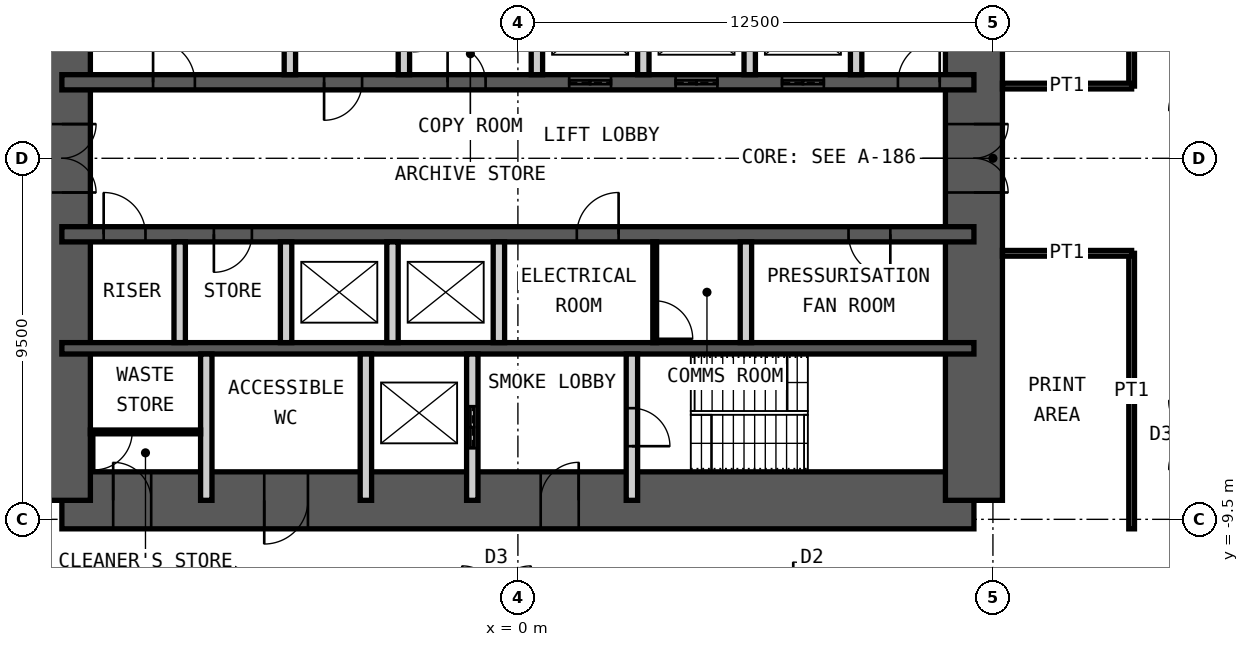
"""IFC4 building model, lengths in metres.
Left out: names, types, materials, properties, quantities, classifications, styles, units other than length and angle.
Written with IfcOpenShell. Run it as: python <this file> out.ifc"""

import sys

from ifc_helpers import new_model, si_unit, direction, frame, frame_2d, origin, place, context, subcontext, project, spatial, rectangle, extrude, element, fill, save


model = new_model("IFC4")
c1 = context("Model", 3, precision=1e-05, world=origin(), true_north=direction((0.0, 1.0)))
c2 = subcontext(c1, "Body", "Model", "MODEL_VIEW")
j1 = project(units=[si_unit("LENGTHUNIT", "METRE"), si_unit("PLANEANGLEUNIT", "RADIAN")], contexts=[c1])
p1 = place(None, origin())
s1 = spatial("IfcSite", under=j1, at=p1, CompositionType="ELEMENT")
p2 = place(p1, origin())
s2 = spatial("IfcBuilding", under=s1, at=p2, CompositionType="ELEMENT")
p3 = place(p2, frame((0.0, 0.0, 157.6)))
s3 = spatial("IfcBuildingStorey", under=s2, at=p3, CompositionType="ELEMENT", Elevation=157.6)
p4 = place(p3, frame((-12.0, -9.0, 0.0), z_axis=(0.0, 0.0, 1.0), x_axis=(1.0, 0.0, 0.0)))
e1 = element("IfcWall", 1, at=p4, inside=s3, PredefinedType="SHEAR", context=c2, shape_type="SweptSolid", body=[
    extrude(rectangle(XDim=24.0, YDim=1.5, at=frame_2d((12.0, 0.0))), origin(), (0.0, 0.0, 1.0), 4.2),
])
p5 = place(p4, frame((1.35, 0.0, 0.0)))
e2 = element("IfcOpeningElement", 2, at=p5, cuts=e1, PredefinedType="OPENING", context=c2, shape_type="SweptSolid", body=[
    extrude(rectangle(XDim=1.0, YDim=2.1, at=frame_2d((0.5, 1.05))), frame((0.0, 0.76, 0.0), z_axis=(0.0, -1.0, 0.0), x_axis=(1.0, 0.0, 0.0)), (0.0, 0.0, 1.0), 1.52),
])
p6 = place(p4, frame((5.325, 0.0, 0.0)))
e3 = element("IfcOpeningElement", 3, at=p6, cuts=e1, PredefinedType="OPENING", context=c2, shape_type="SweptSolid", body=[
    extrude(rectangle(XDim=1.15, YDim=2.1, at=frame_2d((0.575, 1.05))), frame((0.0, 0.76, 0.0), z_axis=(0.0, -1.0, 0.0), x_axis=(1.0, 0.0, 0.0)), (0.0, 0.0, 1.0), 1.52),
])
p7 = place(p4, frame((12.6, 0.0, 0.0)))
e4 = element("IfcOpeningElement", 4, at=p7, cuts=e1, PredefinedType="OPENING", context=c2, shape_type="SweptSolid", body=[
    extrude(rectangle(XDim=1.0, YDim=2.1, at=frame_2d((0.5, 1.05))), frame((0.0, 0.76, 0.0), z_axis=(0.0, -1.0, 0.0), x_axis=(1.0, 0.0, 0.0)), (0.0, 0.0, 1.0), 1.52),
])
p8 = place(p3, frame((12.0, -9.0, 0.0), z_axis=(0.0, 0.0, 1.0), x_axis=(0.0, 1.0, 0.0)))
e5 = element("IfcWall", 5, at=p8, inside=s3, PredefinedType="SHEAR", context=c2, shape_type="SweptSolid", body=[
    extrude(rectangle(XDim=18.0, YDim=1.5, at=frame_2d((9.0, 0.0))), origin(), (0.0, 0.0, 1.0), 4.2),
])
p9 = place(p8, frame((8.1, 0.0, 0.0)))
e6 = element("IfcOpeningElement", 6, at=p9, cuts=e5, PredefinedType="OPENING", context=c2, shape_type="SweptSolid", body=[
    extrude(rectangle(XDim=1.8, YDim=2.1, at=frame_2d((0.9, 1.05))), frame((0.0, 0.76, 0.0), z_axis=(0.0, -1.0, 0.0), x_axis=(1.0, 0.0, 0.0)), (0.0, 0.0, 1.0), 1.52),
])
p10 = place(p3, frame((-12.0, -9.0, 0.0), z_axis=(0.0, 0.0, 1.0), x_axis=(0.0, 1.0, 0.0)))
e7 = element("IfcWall", 7, at=p10, inside=s3, PredefinedType="SHEAR", context=c2, shape_type="SweptSolid", body=[
    extrude(rectangle(XDim=18.0, YDim=1.5, at=frame_2d((9.0, 0.0))), origin(), (0.0, 0.0, 1.0), 4.2),
])
p11 = place(p10, frame((8.1, 0.0, 0.0)))
e8 = element("IfcOpeningElement", 8, at=p11, cuts=e7, PredefinedType="OPENING", context=c2, shape_type="SweptSolid", body=[
    extrude(rectangle(XDim=1.8, YDim=2.1, at=frame_2d((0.9, 1.05))), frame((0.0, 0.76, 0.0), z_axis=(0.0, -1.0, 0.0), x_axis=(1.0, 0.0, 0.0)), (0.0, 0.0, 1.0), 1.52),
])
p12 = place(p3, frame((-12.0, 2.0, 0.0), z_axis=(0.0, 0.0, 1.0), x_axis=(1.0, 0.0, 0.0)))
e9 = element("IfcWall", 9, at=p12, inside=s3, PredefinedType="SHEAR", context=c2, shape_type="SweptSolid", body=[
    extrude(rectangle(XDim=24.0, YDim=0.4, at=frame_2d((12.0, 0.0))), origin(), (0.0, 0.0, 1.0), 4.2),
])
p13 = place(p12, frame((2.4, 0.0, 0.0)))
e10 = element("IfcOpeningElement", 10, at=p13, cuts=e9, PredefinedType="OPENING", context=c2, shape_type="SweptSolid", body=[
    extrude(rectangle(XDim=1.1, YDim=2.1, at=frame_2d((0.55, 1.05))), frame((0.0, 0.21, 0.0), z_axis=(0.0, -1.0, 0.0), x_axis=(1.0, 0.0, 0.0)), (0.0, 0.0, 1.0), 0.42),
])
p14 = place(p12, frame((22.0, 0.0, 0.0)))
e11 = element("IfcOpeningElement", 11, at=p14, cuts=e9, PredefinedType="OPENING", context=c2, shape_type="SweptSolid", body=[
    extrude(rectangle(XDim=1.1, YDim=2.1, at=frame_2d((0.55, 1.05))), frame((0.0, 0.21, 0.0), z_axis=(0.0, -1.0, 0.0), x_axis=(1.0, 0.0, 0.0)), (0.0, 0.0, 1.0), 0.42),
])
p15 = place(p12, frame((10.15, 0.0, 0.0)))
e12 = element("IfcOpeningElement", 12, at=p15, cuts=e9, PredefinedType="OPENING", context=c2, shape_type="SweptSolid", body=[
    extrude(rectangle(XDim=1.0, YDim=2.1, at=frame_2d((0.5, 1.05))), frame((0.0, 0.21, 0.0), z_axis=(0.0, -1.0, 0.0), x_axis=(1.0, 0.0, 0.0)), (0.0, 0.0, 1.0), 0.42),
])
p16 = place(p12, frame((6.9, 0.0, 0.0)))
e13 = element("IfcOpeningElement", 13, at=p16, cuts=e9, PredefinedType="OPENING", context=c2, shape_type="SweptSolid", body=[
    extrude(rectangle(XDim=1.0, YDim=2.1, at=frame_2d((0.5, 1.05))), frame((0.0, 0.21, 0.0), z_axis=(0.0, -1.0, 0.0), x_axis=(1.0, 0.0, 0.0)), (0.0, 0.0, 1.0), 0.42),
])
p17 = place(p12, frame((13.35, 0.0, 0.0)))
e14 = element("IfcOpeningElement", 14, at=p17, cuts=e9, PredefinedType="OPENING", context=c2, shape_type="SweptSolid", body=[
    extrude(rectangle(XDim=1.1, YDim=2.4, at=frame_2d((0.55, 1.2))), frame((0.0, 0.21, 0.0), z_axis=(0.0, -1.0, 0.0), x_axis=(1.0, 0.0, 0.0)), (0.0, 0.0, 1.0), 0.42),
])
p18 = place(p12, frame((16.15, 0.0, 0.0)))
e15 = element("IfcOpeningElement", 15, at=p18, cuts=e9, PredefinedType="OPENING", context=c2, shape_type="SweptSolid", body=[
    extrude(rectangle(XDim=1.1, YDim=2.4, at=frame_2d((0.55, 1.2))), frame((0.0, 0.21, 0.0), z_axis=(0.0, -1.0, 0.0), x_axis=(1.0, 0.0, 0.0)), (0.0, 0.0, 1.0), 0.42),
])
p19 = place(p12, frame((18.95, 0.0, 0.0)))
e16 = element("IfcOpeningElement", 16, at=p19, cuts=e9, PredefinedType="OPENING", context=c2, shape_type="SweptSolid", body=[
    extrude(rectangle(XDim=1.1, YDim=2.4, at=frame_2d((0.55, 1.2))), frame((0.0, 0.21, 0.0), z_axis=(0.0, -1.0, 0.0), x_axis=(1.0, 0.0, 0.0)), (0.0, 0.0, 1.0), 0.42),
])
p20 = place(p3, frame((-12.0, -2.0, 0.0), z_axis=(0.0, 0.0, 1.0), x_axis=(1.0, 0.0, 0.0)))
e17 = element("IfcWall", 17, at=p20, inside=s3, PredefinedType="SHEAR", context=c2, shape_type="SweptSolid", body=[
    extrude(rectangle(XDim=24.0, YDim=0.4, at=frame_2d((12.0, 0.0))), origin(), (0.0, 0.0, 1.0), 4.2),
])
p21 = place(p20, frame((1.1, 0.0, 0.0)))
e18 = element("IfcOpeningElement", 18, at=p21, cuts=e17, PredefinedType="OPENING", context=c2, shape_type="SweptSolid", body=[
    extrude(rectangle(XDim=1.1, YDim=2.1, at=frame_2d((0.55, 1.05))), frame((0.0, 0.21, 0.0), z_axis=(0.0, -1.0, 0.0), x_axis=(1.0, 0.0, 0.0)), (0.0, 0.0, 1.0), 0.42),
])
p22 = place(p20, frame((13.55, 0.0, 0.0)))
e19 = element("IfcOpeningElement", 19, at=p22, cuts=e17, PredefinedType="OPENING", context=c2, shape_type="SweptSolid", body=[
    extrude(rectangle(XDim=1.1, YDim=2.1, at=frame_2d((0.55, 1.05))), frame((0.0, 0.21, 0.0), z_axis=(0.0, -1.0, 0.0), x_axis=(1.0, 0.0, 0.0)), (0.0, 0.0, 1.0), 0.42),
])
p23 = place(p20, frame((20.7, 0.0, 0.0)))
e20 = element("IfcOpeningElement", 20, at=p23, cuts=e17, PredefinedType="OPENING", context=c2, shape_type="SweptSolid", body=[
    extrude(rectangle(XDim=1.1, YDim=2.1, at=frame_2d((0.55, 1.05))), frame((0.0, 0.21, 0.0), z_axis=(0.0, -1.0, 0.0), x_axis=(1.0, 0.0, 0.0)), (0.0, 0.0, 1.0), 0.42),
])
p24 = place(p20, frame((4.0, 0.0, 0.0)))
e21 = element("IfcOpeningElement", 21, at=p24, cuts=e17, PredefinedType="OPENING", context=c2, shape_type="SweptSolid", body=[
    extrude(rectangle(XDim=1.0, YDim=2.1, at=frame_2d((0.5, 1.05))), frame((0.0, 0.21, 0.0), z_axis=(0.0, -1.0, 0.0), x_axis=(1.0, 0.0, 0.0)), (0.0, 0.0, 1.0), 0.42),
])
p25 = place(p3, frame((-12.0, -5.0, 0.0), z_axis=(0.0, 0.0, 1.0), x_axis=(1.0, 0.0, 0.0)))
e22 = element("IfcWall", 22, at=p25, inside=s3, PredefinedType="SHEAR", context=c2, shape_type="SweptSolid", body=[
    extrude(rectangle(XDim=24.0, YDim=0.3, at=frame_2d((12.0, 0.0))), origin(), (0.0, 0.0, 1.0), 4.2),
])
for number, where, z_axis, x_axis in (
    (23, (-6.0, 2.2, 0.0), (0.0, 0.0, 1.0), (0.0, 1.0, 0.0)),
    (24, (-3.0, 2.2, 0.0), (0.0, 0.0, 1.0), (0.0, 1.0, 0.0)),
    (25, (0.5, 2.2, 0.0), (0.0, 0.0, 1.0), (0.0, 1.0, 0.0)),
    (26, (3.3, 2.2, 0.0), (0.0, 0.0, 1.0), (0.0, 1.0, 0.0)),
    (27, (6.1, 2.2, 0.0), (0.0, 0.0, 1.0), (0.0, 1.0, 0.0)),
    (28, (8.9, 2.2, 0.0), (0.0, 0.0, 1.0), (0.0, 1.0, 0.0)),
    (29, (-8.9, -4.85, 0.0), (0.0, 0.0, 1.0), (0.0, 1.0, 0.0)),
    (30, (-6.1, -4.85, 0.0), (0.0, 0.0, 1.0), (0.0, 1.0, 0.0)),
    (31, (-3.3, -4.85, 0.0), (0.0, 0.0, 1.0), (0.0, 1.0, 0.0)),
    (32, (-0.5, -4.85, 0.0), (0.0, 0.0, 1.0), (0.0, 1.0, 0.0)),
    (33, (6.0, -4.85, 0.0), (0.0, 0.0, 1.0), (0.0, 1.0, 0.0)),
):
    element("IfcWall", number, at=place(p3, frame(where, z_axis=z_axis, x_axis=x_axis)), inside=s3, PredefinedType="PARTITIONING", context=c2, shape_type="SweptSolid", body=[
        extrude(rectangle(XDim=2.65, YDim=0.3, at=frame_2d((1.325, 0.0))), origin(), (0.0, 0.0, 1.0), 3.98),
    ])
for number, where, z_axis, x_axis in (
    (34, (-8.2, -9.0, 0.0), (0.0, 0.0, 1.0), (0.0, 1.0, 0.0)),
    (35, (-4.0, -9.0, 0.0), (0.0, 0.0, 1.0), (0.0, 1.0, 0.0)),
):
    element("IfcWall", number, at=place(p3, frame(where, z_axis=z_axis, x_axis=x_axis)), inside=s3, PredefinedType="PARTITIONING", context=c2, shape_type="SweptSolid", body=[
        extrude(rectangle(XDim=3.85, YDim=0.3, at=frame_2d((1.925, 0.0))), origin(), (0.0, 0.0, 1.0), 3.98),
    ])
p26 = place(p3, frame((-1.2, -9.0, 0.0), z_axis=(0.0, 0.0, 1.0), x_axis=(0.0, 1.0, 0.0)))
e36 = element("IfcWall", 36, at=p26, inside=s3, PredefinedType="PARTITIONING", context=c2, shape_type="SweptSolid", body=[
    extrude(rectangle(XDim=3.85, YDim=0.3, at=frame_2d((1.925, 0.0))), origin(), (0.0, 0.0, 1.0), 3.98),
])
p27 = place(p26, frame((1.375, 0.0, 0.0)))
e37 = element("IfcOpeningElement", 37, at=p27, cuts=e36, PredefinedType="OPENING", context=c2, shape_type="SweptSolid", body=[
    extrude(rectangle(XDim=1.1, YDim=2.4, at=frame_2d((0.55, 1.2))), frame((0.0, 0.16, 0.0), z_axis=(0.0, -1.0, 0.0), x_axis=(1.0, 0.0, 0.0)), (0.0, 0.0, 1.0), 0.32),
])
p28 = place(p3, frame((3.0, -9.0, 0.0), z_axis=(0.0, 0.0, 1.0), x_axis=(0.0, 1.0, 0.0)))
e38 = element("IfcWall", 38, at=p28, inside=s3, PredefinedType="PARTITIONING", context=c2, shape_type="SweptSolid", body=[
    extrude(rectangle(XDim=3.85, YDim=0.3, at=frame_2d((1.925, 0.0))), origin(), (0.0, 0.0, 1.0), 3.98),
])
p29 = place(p28, frame((1.425, 0.0, 0.0)))
e39 = element("IfcOpeningElement", 39, at=p29, cuts=e38, PredefinedType="OPENING", context=c2, shape_type="SweptSolid", body=[
    extrude(rectangle(XDim=1.0, YDim=2.1, at=frame_2d((0.5, 1.05))), frame((0.0, 0.16, 0.0), z_axis=(0.0, -1.0, 0.0), x_axis=(1.0, 0.0, 0.0)), (0.0, 0.0, 1.0), 0.32),
])
p30 = place(p3, frame((3.6, -4.85, 0.0), z_axis=(0.0, 0.0, 1.0), x_axis=(0.0, 1.0, 0.0)))
e40 = element("IfcWall", 40, at=p30, inside=s3, PredefinedType="PARTITIONING", context=c2, shape_type="SweptSolid", body=[
    extrude(rectangle(XDim=2.65, YDim=0.1, at=frame_2d((1.325, 0.0))), origin(), (0.0, 0.0, 1.0), 3.98),
])
p31 = place(p30, frame((0.1, 0.0, 0.0)))
e41 = element("IfcOpeningElement", 41, at=p31, cuts=e40, PredefinedType="OPENING", context=c2, shape_type="SweptSolid", body=[
    extrude(rectangle(XDim=1.0, YDim=2.4, at=frame_2d((0.5, 1.2))), frame((0.0, 0.06, 0.0), z_axis=(0.0, -1.0, 0.0), x_axis=(1.0, 0.0, 0.0)), (0.0, 0.0, 1.0), 0.12),
])
p32 = place(p3, frame((-11.25, -7.2, 0.0), z_axis=(0.0, 0.0, 1.0), x_axis=(1.0, 0.0, 0.0)))
e42 = element("IfcWall", 42, at=p32, inside=s3, PredefinedType="PARTITIONING", context=c2, shape_type="SweptSolid", body=[
    extrude(rectangle(XDim=2.9, YDim=0.1, at=frame_2d((1.45, 0.0))), origin(), (0.0, 0.0, 1.0), 3.98),
])
p33 = place(p32, frame((0.1, 0.0, 0.0)))
e43 = element("IfcOpeningElement", 43, at=p33, cuts=e42, PredefinedType="OPENING", context=c2, shape_type="SweptSolid", body=[
    extrude(rectangle(XDim=1.0, YDim=2.4, at=frame_2d((0.5, 1.2))), frame((0.0, 0.06, 0.0), z_axis=(0.0, -1.0, 0.0), x_axis=(1.0, 0.0, 0.0)), (0.0, 0.0, 1.0), 0.12),
])
p34 = place(p3, frame((16.15, 1.9, 0.0), z_axis=(0.0, 0.0, 1.0), x_axis=(0.0, 1.0, 0.0)))
e44 = element("IfcWall", 44, at=p34, inside=s3, PredefinedType="PARTITIONING", context=c2, shape_type="SweptSolid", body=[
    extrude(rectangle(XDim=7.85, YDim=0.15, at=frame_2d((3.925, 0.0))), origin(), (0.0, 0.0, 1.0), 4.03),
])
p35 = place(p3, frame((12.75, 1.9, 0.0), z_axis=(0.0, 0.0, 1.0), x_axis=(1.0, 0.0, 0.0)))
e45 = element("IfcWall", 45, at=p35, inside=s3, PredefinedType="PARTITIONING", context=c2, shape_type="SweptSolid", body=[
    extrude(rectangle(XDim=3.4, YDim=0.15, at=frame_2d((1.7, 0.0))), origin(), (0.0, 0.0, 1.0), 2.93),
])
p36 = place(p3, frame((16.15, -9.75, 0.0), z_axis=(0.0, 0.0, 1.0), x_axis=(0.0, 1.0, 0.0)))
e46 = element("IfcWall", 46, at=p36, inside=s3, PredefinedType="PARTITIONING", context=c2, shape_type="SweptSolid", body=[
    extrude(rectangle(XDim=7.25, YDim=0.15, at=frame_2d((3.625, 0.0))), origin(), (0.0, 0.0, 1.0), 4.03),
])
p37 = place(p3, frame((12.75, -2.5, 0.0), z_axis=(0.0, 0.0, 1.0), x_axis=(1.0, 0.0, 0.0)))
e47 = element("IfcWall", 47, at=p37, inside=s3, PredefinedType="PARTITIONING", context=c2, shape_type="SweptSolid", body=[
    extrude(rectangle(XDim=3.4, YDim=0.15, at=frame_2d((1.7, 0.0))), origin(), (0.0, 0.0, 1.0), 3.33),
])
p38 = place(p5, origin())
e48 = element("IfcDoor", 48, at=p38, inside=s3, OperationType="SINGLE_SWING_RIGHT", PredefinedType="DOOR", context=c2, shape_type="SweptSolid", body=[
    extrude(rectangle(XDim=1.0, YDim=2.1, at=frame_2d((0.5, 1.05))), frame((0.0, 0.025, 0.0), z_axis=(0.0, -1.0, 0.0), x_axis=(1.0, 0.0, 0.0)), (0.0, 0.0, 1.0), 0.05),
])
fill(e2, e48)
p39 = place(p6, origin())
e49 = element("IfcDoor", 49, at=p39, inside=s3, OperationType="SINGLE_SWING_LEFT", PredefinedType="DOOR", context=c2, shape_type="SweptSolid", body=[
    extrude(rectangle(XDim=1.15, YDim=2.1, at=frame_2d((0.575, 1.05))), frame((0.0, 0.025, 0.0), z_axis=(0.0, -1.0, 0.0), x_axis=(1.0, 0.0, 0.0)), (0.0, 0.0, 1.0), 0.05),
])
fill(e3, e49)
p40 = place(p7, origin())
e50 = element("IfcDoor", 50, at=p40, inside=s3, OperationType="SINGLE_SWING_LEFT", PredefinedType="DOOR", context=c2, shape_type="SweptSolid", body=[
    extrude(rectangle(XDim=1.0, YDim=2.1, at=frame_2d((0.5, 1.05))), frame((0.0, 0.025, 0.0), z_axis=(0.0, -1.0, 0.0), x_axis=(1.0, 0.0, 0.0)), (0.0, 0.0, 1.0), 0.05),
])
fill(e4, e50)
p41 = place(p29, origin())
e51 = element("IfcDoor", 51, at=p41, inside=s3, OperationType="SINGLE_SWING_LEFT", PredefinedType="DOOR", context=c2, shape_type="SweptSolid", body=[
    extrude(rectangle(XDim=1.0, YDim=2.1, at=frame_2d((0.5, 1.05))), frame((0.0, 0.025, 0.0), z_axis=(0.0, -1.0, 0.0), x_axis=(1.0, 0.0, 0.0)), (0.0, 0.0, 1.0), 0.05),
])
fill(e39, e51)
p42 = place(p13, origin())
e52 = element("IfcDoor", 52, at=p42, inside=s3, OperationType="SINGLE_SWING_RIGHT", PredefinedType="DOOR", context=c2, shape_type="SweptSolid", body=[
    extrude(rectangle(XDim=1.1, YDim=2.1, at=frame_2d((0.55, 1.05))), frame((0.0, 0.025, 0.0), z_axis=(0.0, -1.0, 0.0), x_axis=(1.0, 0.0, 0.0)), (0.0, 0.0, 1.0), 0.05),
])
fill(e10, e52)
p43 = place(p21, origin())
e53 = element("IfcDoor", 53, at=p43, inside=s3, OperationType="SINGLE_SWING_RIGHT", PredefinedType="DOOR", context=c2, shape_type="SweptSolid", body=[
    extrude(rectangle(XDim=1.1, YDim=2.1, at=frame_2d((0.55, 1.05))), frame((0.0, 0.025, 0.0), z_axis=(0.0, -1.0, 0.0), x_axis=(1.0, 0.0, 0.0)), (0.0, 0.0, 1.0), 0.05),
])
fill(e18, e53)
p44 = place(p14, origin())
e54 = element("IfcDoor", 54, at=p44, inside=s3, OperationType="SINGLE_SWING_LEFT", PredefinedType="DOOR", context=c2, shape_type="SweptSolid", body=[
    extrude(rectangle(XDim=1.1, YDim=2.1, at=frame_2d((0.55, 1.05))), frame((0.0, 0.025, 0.0), z_axis=(0.0, -1.0, 0.0), x_axis=(1.0, 0.0, 0.0)), (0.0, 0.0, 1.0), 0.05),
])
fill(e11, e54)
p45 = place(p15, origin())
e55 = element("IfcDoor", 55, at=p45, inside=s3, OperationType="SINGLE_SWING_RIGHT", PredefinedType="DOOR", context=c2, shape_type="SweptSolid", body=[
    extrude(rectangle(XDim=1.0, YDim=2.1, at=frame_2d((0.5, 1.05))), frame((0.0, 0.025, 0.0), z_axis=(0.0, -1.0, 0.0), x_axis=(1.0, 0.0, 0.0)), (0.0, 0.0, 1.0), 0.05),
])
fill(e12, e55)
p46 = place(p22, origin())
e56 = element("IfcDoor", 56, at=p46, inside=s3, OperationType="SINGLE_SWING_LEFT", PredefinedType="DOOR", context=c2, shape_type="SweptSolid", body=[
    extrude(rectangle(XDim=1.1, YDim=2.1, at=frame_2d((0.55, 1.05))), frame((0.0, 0.025, 0.0), z_axis=(0.0, -1.0, 0.0), x_axis=(1.0, 0.0, 0.0)), (0.0, 0.0, 1.0), 0.05),
])
fill(e19, e56)
p47 = place(p23, origin())
e57 = element("IfcDoor", 57, at=p47, inside=s3, OperationType="SINGLE_SWING_RIGHT", PredefinedType="DOOR", context=c2, shape_type="SweptSolid", body=[
    extrude(rectangle(XDim=1.1, YDim=2.1, at=frame_2d((0.55, 1.05))), frame((0.0, 0.025, 0.0), z_axis=(0.0, -1.0, 0.0), x_axis=(1.0, 0.0, 0.0)), (0.0, 0.0, 1.0), 0.05),
])
fill(e20, e57)
p48 = place(p9, origin())
e58 = element("IfcDoor", 58, at=p48, inside=s3, OperationType="DOUBLE_DOOR_DOUBLE_SWING", PredefinedType="DOOR", context=c2, shape_type="SweptSolid", body=[
    extrude(rectangle(XDim=1.8, YDim=2.1, at=frame_2d((0.9, 1.05))), frame((0.0, 0.025, 0.0), z_axis=(0.0, -1.0, 0.0), x_axis=(1.0, 0.0, 0.0)), (0.0, 0.0, 1.0), 0.05),
])
fill(e6, e58)
p49 = place(p11, origin())
e59 = element("IfcDoor", 59, at=p49, inside=s3, OperationType="DOUBLE_DOOR_DOUBLE_SWING", PredefinedType="DOOR", context=c2, shape_type="SweptSolid", body=[
    extrude(rectangle(XDim=1.8, YDim=2.1, at=frame_2d((0.9, 1.05))), frame((0.0, 0.025, 0.0), z_axis=(0.0, -1.0, 0.0), x_axis=(1.0, 0.0, 0.0)), (0.0, 0.0, 1.0), 0.05),
])
fill(e8, e59)
p50 = place(p27, origin())
e60 = element("IfcDoor", 60, at=p50, inside=s3, OperationType="DOUBLE_DOOR_SLIDING", PredefinedType="DOOR", context=c2, shape_type="SweptSolid", body=[
    extrude(rectangle(XDim=1.1, YDim=2.4, at=frame_2d((0.55, 1.2))), frame((0.0, 0.025, 0.0), z_axis=(0.0, -1.0, 0.0), x_axis=(1.0, 0.0, 0.0)), (0.0, 0.0, 1.0), 0.05),
])
fill(e37, e60)
p51 = place(p16, origin())
e61 = element("IfcDoor", 61, at=p51, inside=s3, OperationType="SINGLE_SWING_LEFT", PredefinedType="DOOR", context=c2, shape_type="SweptSolid", body=[
    extrude(rectangle(XDim=1.0, YDim=2.1, at=frame_2d((0.5, 1.05))), frame((0.0, 0.025, 0.0), z_axis=(0.0, -1.0, 0.0), x_axis=(1.0, 0.0, 0.0)), (0.0, 0.0, 1.0), 0.05),
])
fill(e13, e61)
p52 = place(p17, origin())
e62 = element("IfcDoor", 62, at=p52, inside=s3, OperationType="DOUBLE_DOOR_SLIDING", PredefinedType="DOOR", context=c2, shape_type="SweptSolid", body=[
    extrude(rectangle(XDim=1.1, YDim=2.4, at=frame_2d((0.55, 1.2))), frame((0.0, 0.025, 0.0), z_axis=(0.0, -1.0, 0.0), x_axis=(1.0, 0.0, 0.0)), (0.0, 0.0, 1.0), 0.05),
])
fill(e14, e62)
p53 = place(p18, origin())
e63 = element("IfcDoor", 63, at=p53, inside=s3, OperationType="DOUBLE_DOOR_SLIDING", PredefinedType="DOOR", context=c2, shape_type="SweptSolid", body=[
    extrude(rectangle(XDim=1.1, YDim=2.4, at=frame_2d((0.55, 1.2))), frame((0.0, 0.025, 0.0), z_axis=(0.0, -1.0, 0.0), x_axis=(1.0, 0.0, 0.0)), (0.0, 0.0, 1.0), 0.05),
])
fill(e15, e63)
p54 = place(p19, origin())
e64 = element("IfcDoor", 64, at=p54, inside=s3, OperationType="DOUBLE_DOOR_SLIDING", PredefinedType="DOOR", context=c2, shape_type="SweptSolid", body=[
    extrude(rectangle(XDim=1.1, YDim=2.4, at=frame_2d((0.55, 1.2))), frame((0.0, 0.025, 0.0), z_axis=(0.0, -1.0, 0.0), x_axis=(1.0, 0.0, 0.0)), (0.0, 0.0, 1.0), 0.05),
])
fill(e16, e64)
p55 = place(p24, origin())
e65 = element("IfcDoor", 65, at=p55, inside=s3, OperationType="SINGLE_SWING_LEFT", PredefinedType="DOOR", context=c2, shape_type="SweptSolid", body=[
    extrude(rectangle(XDim=1.0, YDim=2.1, at=frame_2d((0.5, 1.05))), frame((0.0, 0.025, 0.0), z_axis=(0.0, -1.0, 0.0), x_axis=(1.0, 0.0, 0.0)), (0.0, 0.0, 1.0), 0.05),
])
fill(e21, e65)
p56 = place(p31, origin())
e66 = element("IfcDoor", 66, at=p56, inside=s3, OperationType="SINGLE_SWING_LEFT", PredefinedType="DOOR", context=c2, shape_type="SweptSolid", body=[
    extrude(rectangle(XDim=1.0, YDim=2.4, at=frame_2d((0.5, 1.2))), frame((0.0, 0.025, 0.0), z_axis=(0.0, -1.0, 0.0), x_axis=(1.0, 0.0, 0.0)), (0.0, 0.0, 1.0), 0.05),
])
fill(e41, e66)
p57 = place(p33, origin())
e67 = element("IfcDoor", 67, at=p57, inside=s3, OperationType="SINGLE_SWING_LEFT", PredefinedType="DOOR", context=c2, shape_type="SweptSolid", body=[
    extrude(rectangle(XDim=1.0, YDim=2.4, at=frame_2d((0.5, 1.2))), frame((0.0, 0.025, 0.0), z_axis=(0.0, -1.0, 0.0), x_axis=(1.0, 0.0, 0.0)), (0.0, 0.0, 1.0), 0.05),
])
fill(e43, e67)
save(model, sys.argv[1])
